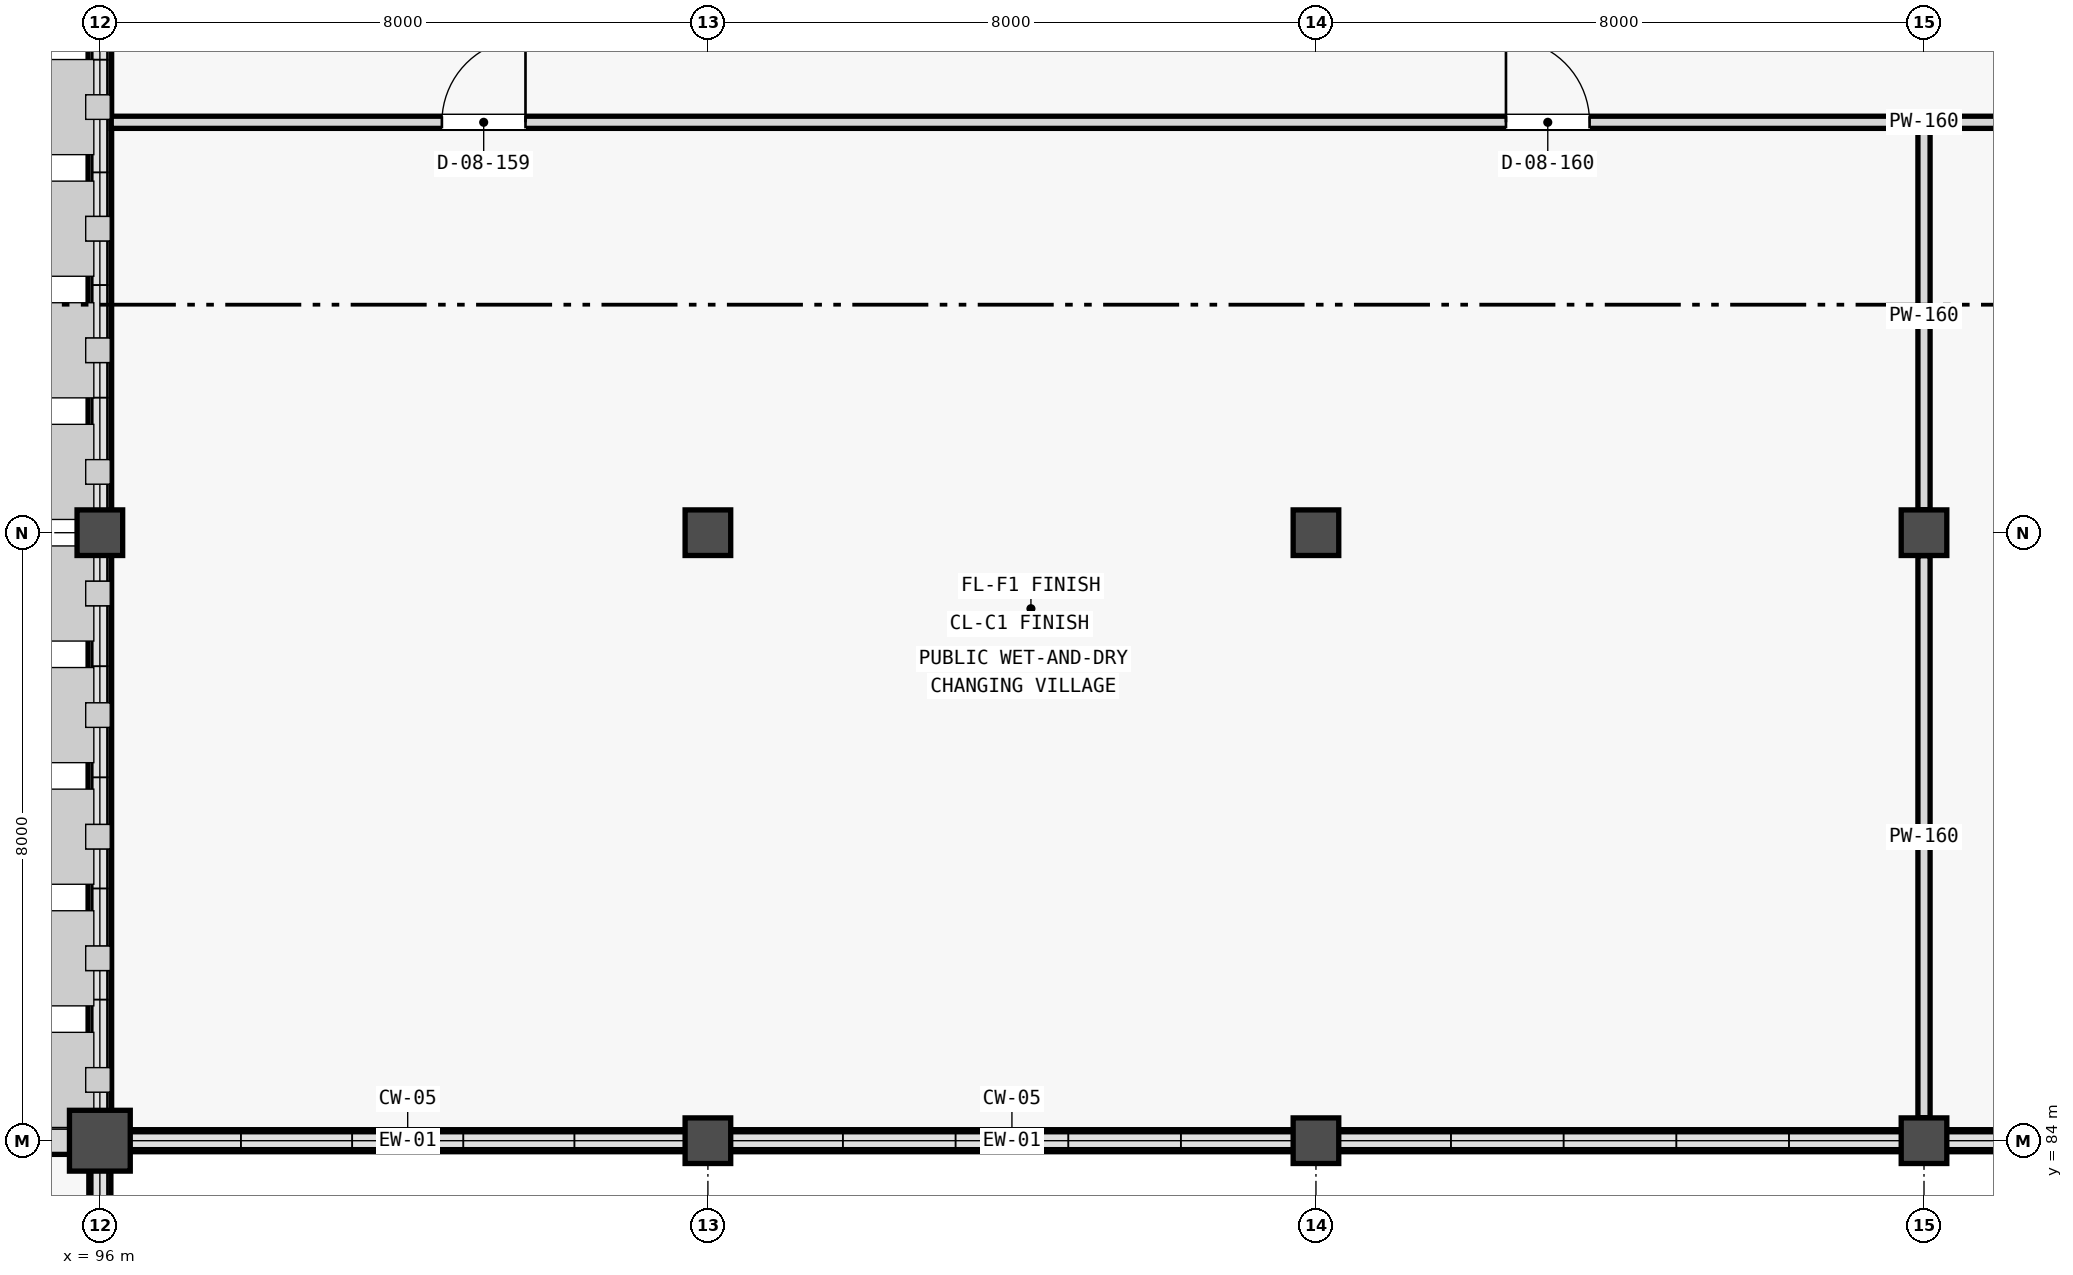
"""IFC4 building model, lengths in metres.
Left out: names, types, materials, properties, quantities, classifications, styles, units other than length and angle.
Written with IfcOpenShell. Run it as: python <this file> out.ifc"""

import sys

from ifc_helpers import new_model, si_unit, direction, frame, frame_2d, origin, origin_2d, place, context, subcontext, project, spatial, rectangle, extrude, element, fill, save


model = new_model("IFC4")
c1 = context("Model", 3, precision=1e-05, world=origin(), true_north=direction((0.0, 1.0)))
c2 = subcontext(c1, "Body", "Model", "MODEL_VIEW")
j1 = project(units=[si_unit("LENGTHUNIT", "METRE"), si_unit("PLANEANGLEUNIT", "RADIAN")], contexts=[c1])
p1 = place(None, origin())
s1 = spatial("IfcSite", under=j1, at=p1, CompositionType="ELEMENT")
p2 = place(p1, origin())
s2 = spatial("IfcBuilding", under=s1, at=p2, CompositionType="ELEMENT")
p3 = place(p2, origin())
s3 = spatial("IfcBuildingStorey", under=s2, at=p3, CompositionType="ELEMENT", Elevation=0.0)
p4 = place(p3, frame((96.0, 84.0, 0.0), z_axis=(0.0, 0.0, 1.0), x_axis=(1.0, 0.0, 0.0)))
e1 = element("IfcColumn", 1, at=p4, inside=s3, PredefinedType="COLUMN", context=c2, shape_type="SweptSolid", body=[
    extrude(rectangle(XDim=0.8, YDim=0.8, at=origin_2d()), origin(), (0.0, 0.0, 1.0), 5.125),
])
for number, where, z_axis, x_axis in (
    (2, (96.0, 92.0, 0.0), (0.0, 0.0, 1.0), (1.0, 0.0, 0.0)),
    (3, (104.0, 84.0, 0.0), (0.0, 0.0, 1.0), (1.0, 0.0, 0.0)),
    (4, (104.0, 92.0, 0.0), (0.0, 0.0, 1.0), (1.0, 0.0, 0.0)),
    (5, (112.0, 84.0, 0.0), (0.0, 0.0, 1.0), (1.0, 0.0, 0.0)),
    (6, (112.0, 92.0, 0.0), (0.0, 0.0, 1.0), (1.0, 0.0, 0.0)),
    (7, (120.0, 84.0, 0.0), (0.0, 0.0, 1.0), (1.0, 0.0, 0.0)),
    (8, (120.0, 92.0, 0.0), (0.0, 0.0, 1.0), (1.0, 0.0, 0.0)),
):
    element("IfcColumn", number, at=place(p3, frame(where, z_axis=z_axis, x_axis=x_axis)), inside=s3, PredefinedType="COLUMN", context=c2, shape_type="SweptSolid", body=[
        extrude(rectangle(XDim=0.6, YDim=0.6, at=origin_2d()), origin(), (0.0, 0.0, 1.0), 5.125),
    ])
p5 = place(p3, frame((88.396, 84.0, 0.0), z_axis=(0.0, 0.0, 1.0), x_axis=(1.0, 0.0, 0.0)))
e9 = element("IfcWall", 9, at=p5, inside=s3, PredefinedType="STANDARD", context=c2, shape_type="SweptSolid", body=[
    extrude(rectangle(XDim=7.208, YDim=0.36, at=frame_2d((3.604, 0.0))), origin(), (0.0, 0.0, 1.0), 4.305),
])
p6 = place(p5, frame((2.629, 0.0, 0.0)))
e10 = element("IfcOpeningElement", 10, at=p6, cuts=e9, PredefinedType="OPENING", context=c2, shape_type="SweptSolid", body=[
    extrude(rectangle(XDim=1.95, YDim=2.25, at=frame_2d((0.975, 1.125))), frame((0.0, 0.19, 0.0), z_axis=(0.0, -1.0, 0.0), x_axis=(1.0, 0.0, 0.0)), (0.0, 0.0, 1.0), 0.38),
])
p7 = place(p3, frame((96.0, 72.396, 0.0), z_axis=(0.0, 0.0, 1.0), x_axis=(0.0, 1.0, 0.0)))
e11 = element("IfcWall", 11, at=p7, inside=s3, PredefinedType="STANDARD", context=c2, shape_type="SweptSolid", body=[
    extrude(rectangle(XDim=11.208, YDim=0.29, at=frame_2d((5.604, 0.0))), origin(), (0.0, 0.0, 1.0), 0.8),
])
p8 = place(p3, frame((96.396, 84.0, 0.0), z_axis=(0.0, 0.0, 1.0), x_axis=(1.0, 0.0, 0.0)))
e12 = element("IfcWall", 12, at=p8, inside=s3, PredefinedType="STANDARD", context=c2, shape_type="SweptSolid", body=[
    extrude(rectangle(XDim=7.308, YDim=0.29, at=frame_2d((3.654, 0.0))), origin(), (0.0, 0.0, 1.0), 1.6),
])
for number, where, z_axis, x_axis in (
    (13, (104.296, 84.0, 0.0), (0.0, 0.0, 1.0), (1.0, 0.0, 0.0)),
    (14, (112.296, 84.0, 0.0), (0.0, 0.0, 1.0), (1.0, 0.0, 0.0)),
    (15, (120.296, 84.0, 0.0), (0.0, 0.0, 1.0), (1.0, 0.0, 0.0)),
):
    element("IfcWall", number, at=place(p3, frame(where, z_axis=z_axis, x_axis=x_axis)), inside=s3, PredefinedType="STANDARD", context=c2, shape_type="SweptSolid", body=[
        extrude(rectangle(XDim=7.408, YDim=0.29, at=frame_2d((3.704, 0.0))), origin(), (0.0, 0.0, 1.0), 1.6),
    ])
p9 = place(p3, frame((96.0, 84.396, 0.0), z_axis=(0.0, 0.0, 1.0), x_axis=(0.0, 1.0, 0.0)))
e16 = element("IfcWall", 16, at=p9, inside=s3, PredefinedType="STANDARD", context=c2, shape_type="SweptSolid", body=[
    extrude(rectangle(XDim=7.308, YDim=0.31, at=frame_2d((3.654, 0.0))), origin(), (0.0, 0.0, 1.0), 1.45),
])
p10 = place(p3, frame((96.0, 92.296, 0.0), z_axis=(0.0, 0.0, 1.0), x_axis=(0.0, 1.0, 0.0)))
e17 = element("IfcWall", 17, at=p10, inside=s3, PredefinedType="STANDARD", context=c2, shape_type="SweptSolid", body=[
    extrude(rectangle(XDim=7.408, YDim=0.31, at=frame_2d((3.704, 0.0))), origin(), (0.0, 0.0, 1.0), 1.45),
])
p11 = place(p3, frame((96.15, 97.4, 0.0), z_axis=(0.0, 0.0, 1.0), x_axis=(1.0, 0.0, 0.0)))
e18 = element("IfcWall", 18, at=p11, inside=s3, PredefinedType="PARTITIONING", context=c2, shape_type="SweptSolid", body=[
    extrude(rectangle(XDim=47.7, YDim=0.16, at=frame_2d((23.85, 0.0))), origin(), (0.0, 0.0, 1.0), 4.405),
])
p12 = place(p11, frame((4.35, 0.0, 0.0)))
e19 = element("IfcOpeningElement", 19, at=p12, cuts=e18, PredefinedType="OPENING", context=c2, shape_type="SweptSolid", body=[
    extrude(rectangle(XDim=1.1, YDim=2.15, at=frame_2d((0.55, 1.075))), frame((0.0, 0.09, 0.0), z_axis=(0.0, -1.0, 0.0), x_axis=(1.0, 0.0, 0.0)), (0.0, 0.0, 1.0), 0.18),
])
p13 = place(p11, frame((18.35, 0.0, 0.0)))
e20 = element("IfcOpeningElement", 20, at=p13, cuts=e18, PredefinedType="OPENING", context=c2, shape_type="SweptSolid", body=[
    extrude(rectangle(XDim=1.1, YDim=2.15, at=frame_2d((0.55, 1.075))), frame((0.0, 0.09, 0.0), z_axis=(0.0, -1.0, 0.0), x_axis=(1.0, 0.0, 0.0)), (0.0, 0.0, 1.0), 0.18),
])
p14 = place(p11, frame((29.35, 0.0, 0.0)))
e21 = element("IfcOpeningElement", 21, at=p14, cuts=e18, PredefinedType="OPENING", context=c2, shape_type="SweptSolid", body=[
    extrude(rectangle(XDim=1.15, YDim=2.15, at=frame_2d((0.575, 1.075))), frame((0.0, 0.09, 0.0), z_axis=(0.0, -1.0, 0.0), x_axis=(1.0, 0.0, 0.0)), (0.0, 0.0, 1.0), 0.18),
])
p15 = place(p11, frame((42.35, 0.0, 0.0)))
e22 = element("IfcOpeningElement", 22, at=p15, cuts=e18, PredefinedType="OPENING", context=c2, shape_type="SweptSolid", body=[
    extrude(rectangle(XDim=1.15, YDim=2.15, at=frame_2d((0.575, 1.075))), frame((0.0, 0.09, 0.0), z_axis=(0.0, -1.0, 0.0), x_axis=(1.0, 0.0, 0.0)), (0.0, 0.0, 1.0), 0.18),
])
p16 = place(p3, frame((120.0, 84.302, 0.0), z_axis=(0.0, 0.0, 1.0), x_axis=(0.0, 1.0, 0.0)))
e23 = element("IfcWall", 23, at=p16, inside=s3, PredefinedType="PARTITIONING", context=c2, shape_type="SweptSolid", body=[
    extrude(rectangle(XDim=7.396, YDim=0.16, at=frame_2d((3.698, 0.0))), origin(), (0.0, 0.0, 1.0), 4.405),
])
p17 = place(p3, frame((120.0, 92.302, 0.0), z_axis=(0.0, 0.0, 1.0), x_axis=(0.0, 1.0, 0.0)))
e24 = element("IfcWall", 24, at=p17, inside=s3, PredefinedType="PARTITIONING", context=c2, shape_type="SweptSolid", body=[
    extrude(rectangle(XDim=5.098, YDim=0.16, at=frame_2d((2.549, 0.0))), origin(), (0.0, 0.0, 1.0), 4.405),
])
p18 = place(p12, origin())
e25 = element("IfcDoor", 25, at=p18, inside=s3, OperationType="SINGLE_SWING_RIGHT", PredefinedType="DOOR", context=c2, shape_type="SweptSolid", body=[
    extrude(rectangle(XDim=1.1, YDim=2.15, at=frame_2d((0.55, 1.075))), frame((0.0, 0.025, 0.0), z_axis=(0.0, -1.0, 0.0), x_axis=(1.0, 0.0, 0.0)), (0.0, 0.0, 1.0), 0.05),
])
fill(e19, e25)
p19 = place(p13, origin())
e26 = element("IfcDoor", 26, at=p19, inside=s3, OperationType="SINGLE_SWING_LEFT", PredefinedType="DOOR", context=c2, shape_type="SweptSolid", body=[
    extrude(rectangle(XDim=1.1, YDim=2.15, at=frame_2d((0.55, 1.075))), frame((0.0, 0.025, 0.0), z_axis=(0.0, -1.0, 0.0), x_axis=(1.0, 0.0, 0.0)), (0.0, 0.0, 1.0), 0.05),
])
fill(e20, e26)
save(model, sys.argv[1])
